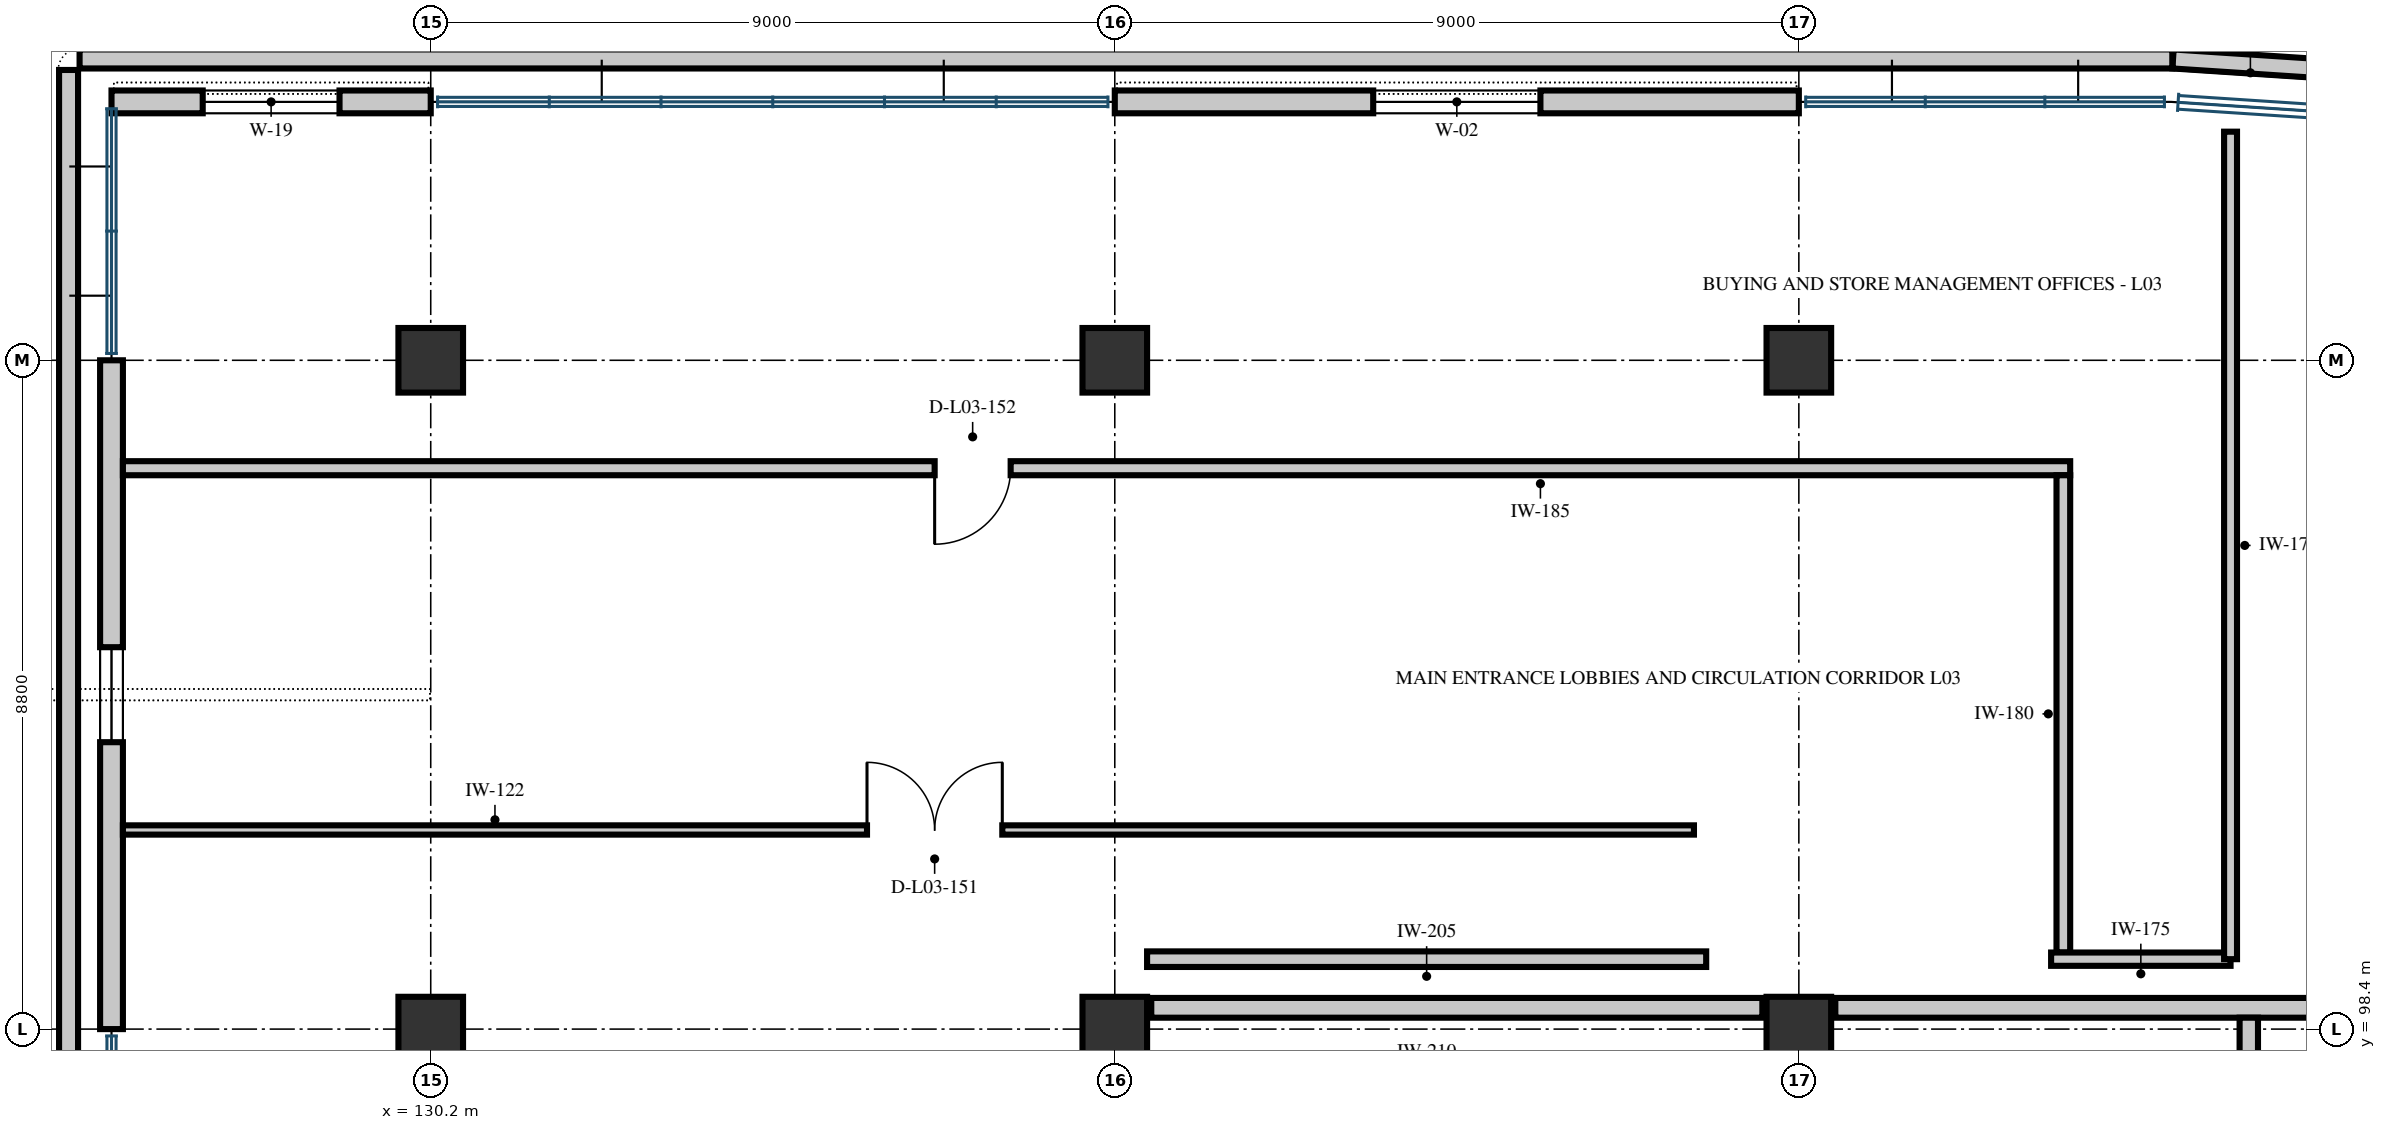
"""IFC4 building model, lengths in metres.
Left out: names, types, materials, properties, quantities, classifications, styles, units other than length and angle.
Written with IfcOpenShell. Run it as: python <this file> out.ifc"""

import sys

from ifc_helpers import new_model, si_unit, direction, frame, frame_2d, origin, origin_2d, place, context, subcontext, project, spatial, rectangle, extrude, element, fill, save


model = new_model("IFC4")
c1 = context("Model", 3, precision=1e-05, world=origin(), true_north=direction((0.0, 1.0)))
c2 = subcontext(c1, "Body", "Model", "MODEL_VIEW")
j1 = project(units=[si_unit("LENGTHUNIT", "METRE"), si_unit("PLANEANGLEUNIT", "RADIAN")], contexts=[c1])
p1 = place(None, origin())
s1 = spatial("IfcSite", under=j1, at=p1, CompositionType="ELEMENT")
p2 = place(p1, origin())
s2 = spatial("IfcBuilding", under=s1, at=p2, CompositionType="ELEMENT")
p3 = place(p2, frame((0.0, 0.0, 15.0)))
s3 = spatial("IfcBuildingStorey", under=s2, at=p3, CompositionType="ELEMENT", Elevation=15.0)
for number, where, z_axis, x_axis in (
    (1, (130.2, 98.4, 0.0), (0.0, 0.0, 1.0), (1.0, 0.0, 0.0)),
    (2, (130.2, 107.2, 0.0), (0.0, 0.0, 1.0), (1.0, 0.0, 0.0)),
    (3, (139.2, 98.4, 0.0), (0.0, 0.0, 1.0), (1.0, 0.0, 0.0)),
    (4, (139.2, 107.2, 0.0), (0.0, 0.0, 1.0), (1.0, 0.0, 0.0)),
    (5, (148.2, 98.4, 0.0), (0.0, 0.0, 1.0), (1.0, 0.0, 0.0)),
    (6, (148.2, 107.2, 0.0), (0.0, 0.0, 1.0), (1.0, 0.0, 0.0)),
):
    element("IfcColumn", number, at=place(p3, frame(where, z_axis=z_axis, x_axis=x_axis)), inside=s3, PredefinedType="COLUMN", context=c2, shape_type="SweptSolid", body=[
        extrude(rectangle(XDim=0.85, YDim=0.85, at=origin_2d()), origin(), (0.0, 0.0, 1.0), 4.8),
    ])
p4 = place(p3, frame((126.0, 98.4, 0.0), z_axis=(0.0, 0.0, 1.0), x_axis=(0.0, 1.0, 0.0)))
e7 = element("IfcWall", 7, at=p4, inside=s3, PredefinedType="SOLIDWALL", context=c2, shape_type="SweptSolid", body=[
    extrude(rectangle(XDim=8.8, YDim=0.3, at=frame_2d((4.4, 0.0))), origin(), (0.0, 0.0, 1.0), 4.52),
])
p5 = place(p4, frame((3.775, 0.0, 1.2)))
e8 = element("IfcOpeningElement", 8, at=p5, cuts=e7, PredefinedType="OPENING", context=c2, shape_type="SweptSolid", body=[
    extrude(rectangle(XDim=1.25, YDim=1.55, at=frame_2d((0.625, 0.775))), frame((0.0, 0.162, 0.0), z_axis=(0.0, -1.0, 0.0), x_axis=(1.0, 0.0, 0.0)), (0.0, 0.0, 1.0), 0.324),
])
p6 = place(p3, frame((126.0, 110.6, 0.0), z_axis=(0.0, 0.0, 1.0), x_axis=(1.0, 0.0, 0.0)))
e9 = element("IfcWall", 9, at=p6, inside=s3, PredefinedType="SOLIDWALL", context=c2, shape_type="SweptSolid", body=[
    extrude(rectangle(XDim=4.2, YDim=0.3, at=frame_2d((2.1, 0.0))), origin(), (0.0, 0.0, 1.0), 4.52),
])
p7 = place(p6, frame((1.2, 0.0, 1.2)))
e10 = element("IfcOpeningElement", 10, at=p7, cuts=e9, PredefinedType="OPENING", context=c2, shape_type="SweptSolid", body=[
    extrude(rectangle(XDim=1.8, YDim=1.5, at=frame_2d((0.9, 0.75))), frame((0.0, 0.162, 0.0), z_axis=(0.0, -1.0, 0.0), x_axis=(1.0, 0.0, 0.0)), (0.0, 0.0, 1.0), 0.324),
])
p8 = place(p3, frame((139.2, 110.6, 0.0), z_axis=(0.0, 0.0, 1.0), x_axis=(1.0, 0.0, 0.0)))
e11 = element("IfcWall", 11, at=p8, inside=s3, PredefinedType="SOLIDWALL", context=c2, shape_type="SweptSolid", body=[
    extrude(rectangle(XDim=9.0, YDim=0.3, at=frame_2d((4.5, 0.0))), origin(), (0.0, 0.0, 1.0), 4.52),
])
p9 = place(p8, frame((3.4, 0.0, 0.9)))
e12 = element("IfcOpeningElement", 12, at=p9, cuts=e11, PredefinedType="OPENING", context=c2, shape_type="SweptSolid", body=[
    extrude(rectangle(XDim=2.2, YDim=2.4, at=frame_2d((1.1, 1.2))), frame((0.0, 0.162, 0.0), z_axis=(0.0, -1.0, 0.0), x_axis=(1.0, 0.0, 0.0)), (0.0, 0.0, 1.0), 0.324),
])
p10 = place(p3, frame((155.188, 111.029, 0.0), z_axis=(0.0, 0.0, 1.0), x_axis=(-0.997852525394, 0.065500668432, 0.0)))
e13 = element("IfcWall", 13, at=p10, inside=s3, PredefinedType="PARAPET", context=c2, shape_type="SweptSolid", body=[
    extrude(rectangle(XDim=2.069, YDim=0.25, at=frame_2d((1.034, 0.0))), origin(), (0.0, 0.0, 1.0), 1.2),
])
p11 = place(p3, frame((153.114, 111.165, 0.0), z_axis=(0.0, 0.0, 1.0), x_axis=(-1.0, 0.0, 0.0)))
e14 = element("IfcWall", 14, at=p11, inside=s3, PredefinedType="PARAPET", context=c2, shape_type="SweptSolid", body=[
    extrude(rectangle(XDim=27.534, YDim=0.25, at=frame_2d((13.767, 0.0))), origin(), (0.0, 0.0, 1.0), 1.2),
])
p12 = place(p3, frame((125.435, 111.02, 0.0), z_axis=(0.0, 0.0, 1.0), x_axis=(0.0, -1.0, 0.0)))
e15 = element("IfcWall", 15, at=p12, inside=s3, PredefinedType="PARAPET", context=c2, shape_type="SweptSolid", body=[
    extrude(rectangle(XDim=22.22, YDim=0.25, at=frame_2d((11.11, 0.0))), origin(), (0.0, 0.0, 1.0), 1.2),
])
for number, where, z_axis, x_axis in (
    (16, (139.68, 98.68, 0.0), (0.0, 0.0, 1.0), (1.0, 0.0, 0.0)),
    (17, (148.68, 98.68, 0.0), (0.0, 0.0, 1.0), (1.0, 0.0, 0.0)),
):
    element("IfcWall", number, at=place(p3, frame(where, z_axis=z_axis, x_axis=x_axis)), inside=s3, PredefinedType="PARTITIONING", context=c2, shape_type="SweptSolid", body=[
        extrude(rectangle(XDim=8.04, YDim=0.26, at=frame_2d((4.02, 0.0))), origin(), (0.0, 0.0, 1.0), 3.46),
    ])
p13 = place(p3, frame((126.15, 101.02, 0.0), z_axis=(0.0, 0.0, 1.0), x_axis=(1.0, 0.0, 0.0)))
e18 = element("IfcWall", 18, at=p13, inside=s3, PredefinedType="PARTITIONING", context=c2, shape_type="SweptSolid", body=[
    extrude(rectangle(XDim=20.67, YDim=0.122, at=frame_2d((10.335, 0.0))), origin(), (0.0, 0.0, 1.0), 3.46),
])
p14 = place(p13, frame((9.79, 0.0, 0.0)))
e19 = element("IfcOpeningElement", 19, at=p14, cuts=e18, PredefinedType="OPENING", context=c2, shape_type="SweptSolid", body=[
    extrude(rectangle(XDim=1.78, YDim=2.32, at=frame_2d((0.89, 1.16))), frame((0.0, 0.073, 0.0), z_axis=(0.0, -1.0, 0.0), x_axis=(1.0, 0.0, 0.0)), (0.0, 0.0, 1.0), 0.146),
])
p15 = place(p3, frame((146.981, 99.32, 0.0), z_axis=(0.0, 0.0, 1.0), x_axis=(-1.0, 0.0, 0.0)))
e20 = element("IfcWall", 20, at=p15, inside=s3, PredefinedType="PARTITIONING", context=c2, shape_type="SweptSolid", body=[
    extrude(rectangle(XDim=7.356, YDim=0.205, at=frame_2d((3.678, 0.0))), origin(), (0.0, 0.0, 1.0), 4.52),
])
p16 = place(p3, frame((151.77, 105.78, 0.0), z_axis=(0.0, 0.0, 1.0), x_axis=(-1.0, 0.0, 0.0)))
e21 = element("IfcWall", 21, at=p16, inside=s3, PredefinedType="PARTITIONING", context=c2, shape_type="SweptSolid", body=[
    extrude(rectangle(XDim=25.62, YDim=0.185, at=frame_2d((12.81, 0.0))), origin(), (0.0, 0.0, 1.0), 3.46),
])
p17 = place(p16, frame((13.94, 0.0, 0.0)))
e22 = element("IfcOpeningElement", 22, at=p17, cuts=e21, PredefinedType="OPENING", context=c2, shape_type="SweptSolid", body=[
    extrude(rectangle(XDim=1.0, YDim=2.2, at=frame_2d((0.5, 1.1))), frame((0.0, 0.104, 0.0), z_axis=(0.0, -1.0, 0.0), x_axis=(1.0, 0.0, 0.0)), (0.0, 0.0, 1.0), 0.209),
])
p18 = place(p3, frame((151.68, 99.407, 0.0), z_axis=(0.0, 0.0, 1.0), x_axis=(0.0, 1.0, 0.0)))
e23 = element("IfcWall", 23, at=p18, inside=s3, PredefinedType="PARTITIONING", context=c2, shape_type="SweptSolid", body=[
    extrude(rectangle(XDim=6.28, YDim=0.18, at=frame_2d((3.14, 0.0))), origin(), (0.0, 0.0, 1.0), 4.52),
])
p19 = place(p3, frame((153.88, 99.32, 0.0), z_axis=(0.0, 0.0, 1.0), x_axis=(-1.0, 0.0, 0.0)))
e24 = element("IfcWall", 24, at=p19, inside=s3, PredefinedType="PARTITIONING", context=c2, shape_type="SweptSolid", body=[
    extrude(rectangle(XDim=2.361, YDim=0.175, at=frame_2d((1.18, 0.0))), origin(), (0.0, 0.0, 1.0), 4.52),
])
p20 = place(p3, frame((153.88, 110.208, 0.0), z_axis=(0.0, 0.0, 1.0), x_axis=(0.0, -1.0, 0.0)))
e25 = element("IfcWall", 25, at=p20, inside=s3, PredefinedType="PARTITIONING", context=c2, shape_type="SweptSolid", body=[
    extrude(rectangle(XDim=10.888, YDim=0.17, at=frame_2d((5.444, 0.0))), origin(), (0.0, 0.0, 1.0), 4.52),
])
p21 = place(p3, frame((154.12, 87.68, 0.0), z_axis=(0.0, 0.0, 1.0), x_axis=(0.0, 1.0, 0.0)))
e26 = element("IfcWall", 26, at=p21, inside=s3, PredefinedType="PARTITIONING", context=c2, shape_type="SweptSolid", body=[
    extrude(rectangle(XDim=10.87, YDim=0.242, at=frame_2d((5.435, 0.0))), origin(), (0.0, 0.0, 1.0), 3.46),
])
p22 = place(p21, frame((3.8, 0.0, 0.0)))
e27 = element("IfcOpeningElement", 27, at=p22, cuts=e26, PredefinedType="OPENING", context=c2, shape_type="SweptSolid", body=[
    extrude(rectangle(XDim=2.2, YDim=2.5, at=frame_2d((1.1, 1.25))), frame((0.0, 0.133, 0.0), z_axis=(0.0, -1.0, 0.0), x_axis=(1.0, 0.0, 0.0)), (0.0, 0.0, 1.0), 0.266),
])
p23 = place(p5, origin())
e28 = element("IfcWindow", 28, at=p23, inside=s3, PartitioningType="SINGLE_PANEL", PredefinedType="WINDOW", context=c2, shape_type="SweptSolid", body=[
    extrude(rectangle(XDim=1.25, YDim=1.55, at=frame_2d((0.625, 0.775))), frame((0.0, 0.03, 0.0), z_axis=(0.0, -1.0, 0.0), x_axis=(1.0, 0.0, 0.0)), (0.0, 0.0, 1.0), 0.06),
])
fill(e8, e28)
p24 = place(p7, origin())
e29 = element("IfcWindow", 29, at=p24, inside=s3, PartitioningType="SINGLE_PANEL", PredefinedType="WINDOW", context=c2, shape_type="SweptSolid", body=[
    extrude(rectangle(XDim=1.8, YDim=1.5, at=frame_2d((0.9, 0.75))), frame((0.0, 0.03, 0.0), z_axis=(0.0, -1.0, 0.0), x_axis=(1.0, 0.0, 0.0)), (0.0, 0.0, 1.0), 0.06),
])
fill(e10, e29)
p25 = place(p9, origin())
e30 = element("IfcWindow", 30, at=p25, inside=s3, PartitioningType="SINGLE_PANEL", PredefinedType="WINDOW", context=c2, shape_type="SweptSolid", body=[
    extrude(rectangle(XDim=2.2, YDim=2.4, at=frame_2d((1.1, 1.2))), frame((0.0, 0.03, 0.0), z_axis=(0.0, -1.0, 0.0), x_axis=(1.0, 0.0, 0.0)), (0.0, 0.0, 1.0), 0.06),
])
fill(e12, e30)
p26 = place(p14, origin())
e31 = element("IfcDoor", 31, at=p26, inside=s3, OperationType="DOUBLE_DOOR_SINGLE_SWING", PredefinedType="DOOR", context=c2, shape_type="SweptSolid", body=[
    extrude(rectangle(XDim=1.78, YDim=2.32, at=frame_2d((0.89, 1.16))), frame((0.0, 0.025, 0.0), z_axis=(0.0, -1.0, 0.0), x_axis=(1.0, 0.0, 0.0)), (0.0, 0.0, 1.0), 0.05),
])
fill(e19, e31)
p27 = place(p17, origin())
e32 = element("IfcDoor", 32, at=p27, inside=s3, OperationType="SINGLE_SWING_RIGHT", PredefinedType="DOOR", context=c2, shape_type="SweptSolid", body=[
    extrude(rectangle(XDim=1.0, YDim=2.2, at=frame_2d((0.5, 1.1))), frame((0.0, 0.025, 0.0), z_axis=(0.0, -1.0, 0.0), x_axis=(1.0, 0.0, 0.0)), (0.0, 0.0, 1.0), 0.05),
])
fill(e22, e32)
save(model, sys.argv[1])
